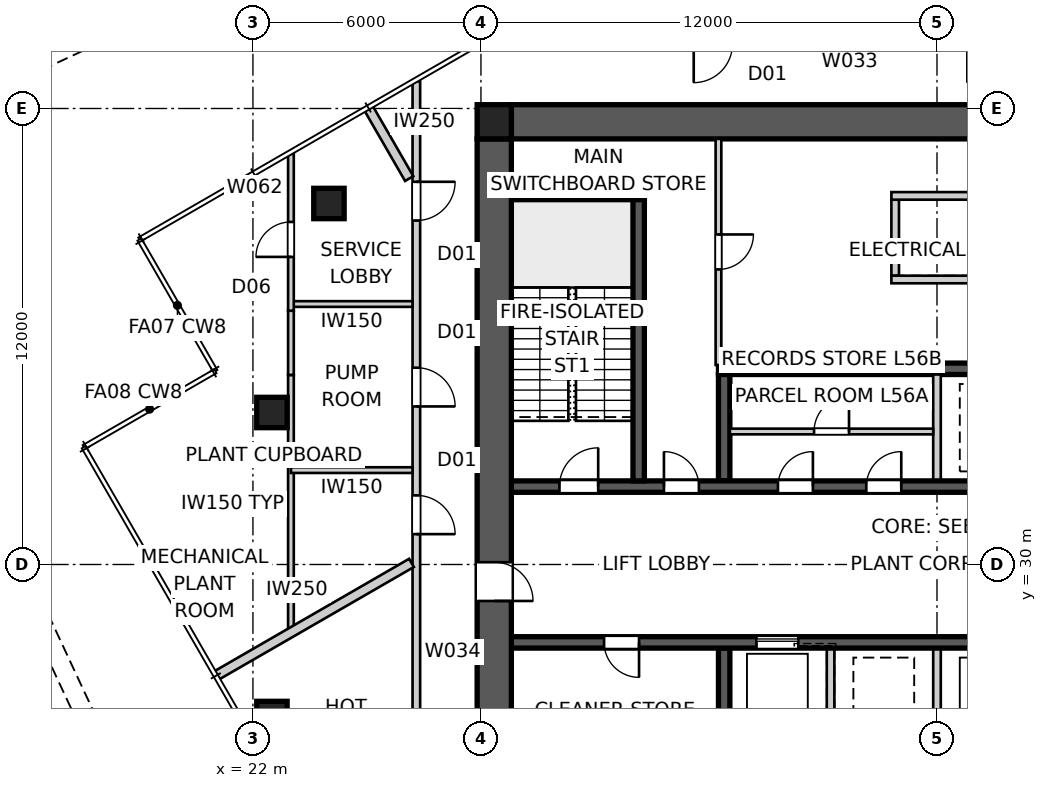
"""IFC4 building model, lengths in metres.
Left out: names, types, materials, properties, quantities, classifications, styles, units other than length and angle.
Written with IfcOpenShell. Run it as: python <this file> out.ifc"""

import sys

from ifc_helpers import new_model, si_unit, direction, frame, frame_2d, origin, origin_2d, place, context, subcontext, project, spatial, polyline, rectangle, outline, extrude, element, fill, save


model = new_model("IFC4")
c1 = context("Model", 3, precision=1e-05, world=origin(), true_north=direction((0.0, 1.0)))
c2 = subcontext(c1, "Body", "Model", "MODEL_VIEW")
j1 = project(units=[si_unit("LENGTHUNIT", "METRE"), si_unit("PLANEANGLEUNIT", "RADIAN")], contexts=[c1])
p1 = place(None, origin())
s1 = spatial("IfcSite", under=j1, at=p1, CompositionType="ELEMENT")
p2 = place(p1, origin())
s2 = spatial("IfcBuilding", under=s1, at=p2, CompositionType="ELEMENT")
p3 = place(p2, frame((0.0, 0.0, 203.2)))
s3 = spatial("IfcBuildingStorey", under=s2, at=p3, CompositionType="ELEMENT", Elevation=203.2)
p4 = place(p3, frame((28.8, 41.65, 0.0), z_axis=(0.0, 0.0, 1.0), x_axis=(1.0, 0.0, 0.0)))
e1 = element("IfcWall", 1, at=p4, inside=s3, PredefinedType="SHEAR", context=c2, shape_type="SweptSolid", body=[
    extrude(outline(polyline([(0.0, -0.45), (22.4, -0.45), (22.4, -0.025), (22.85, -0.025), (22.85, 0.025), (22.4, 0.025), (22.4, 0.45), (0.0, 0.45), (0.0, 0.025), (-0.45, 0.025), (-0.45, -0.025), (0.0, -0.025), (0.0, -0.45)])), origin(), (0.0, 0.0, 1.0), 5.0),
])
p5 = place(p3, frame((28.35, 41.2, 0.0), z_axis=(0.0, 0.0, 1.0), x_axis=(0.0, -1.0, 0.0)))
e2 = element("IfcWall", 2, at=p5, inside=s3, PredefinedType="SHEAR", context=c2, shape_type="SweptSolid", body=[
    extrude(outline(polyline([(0.0, -0.45), (22.4, -0.45), (22.4, -0.025), (22.85, -0.025), (22.85, 0.025), (22.4, 0.025), (22.4, 0.45), (0.0, 0.45), (0.0, 0.025), (-0.45, 0.025), (-0.45, -0.025), (0.0, -0.025), (0.0, -0.45)])), origin(), (0.0, 0.0, 1.0), 5.0),
])
p6 = place(p5, frame((11.14, 0.0, 0.0)))
e3 = element("IfcOpeningElement", 3, at=p6, cuts=e2, PredefinedType="OPENING", context=c2, shape_type="SweptSolid", body=[
    extrude(rectangle(XDim=1.02, YDim=2.4, at=frame_2d((0.51, 1.2))), frame((0.0, 0.46, 0.0), z_axis=(0.0, -1.0, 0.0), x_axis=(1.0, 0.0, 0.0)), (0.0, 0.0, 1.0), 0.92),
])
p7 = place(p3, frame((28.8, 32.05, 0.0), z_axis=(0.0, 0.0, 1.0), x_axis=(1.0, 0.0, 0.0)))
e4 = element("IfcWall", 4, at=p7, inside=s3, PredefinedType="SHEAR", context=c2, shape_type="SweptSolid", body=[
    extrude(rectangle(XDim=22.4, YDim=0.3, at=frame_2d((11.2, 0.0))), origin(), (0.0, 0.0, 1.0), 5.0),
])
p8 = place(p7, frame((19.04, 0.0, 0.0)))
e5 = element("IfcOpeningElement", 5, at=p8, cuts=e4, PredefinedType="OPENING", context=c2, shape_type="SweptSolid", body=[
    extrude(rectangle(XDim=0.92, YDim=2.1, at=frame_2d((0.46, 1.05))), frame((0.0, 0.16, 0.0), z_axis=(0.0, -1.0, 0.0), x_axis=(1.0, 0.0, 0.0)), (0.0, 0.0, 1.0), 0.32),
])
p9 = place(p7, frame((1.265, 0.0, 0.0)))
e6 = element("IfcOpeningElement", 6, at=p9, cuts=e4, PredefinedType="OPENING", context=c2, shape_type="SweptSolid", body=[
    extrude(rectangle(XDim=1.02, YDim=2.1, at=frame_2d((0.51, 1.05))), frame((0.0, 0.16, 0.0), z_axis=(0.0, -1.0, 0.0), x_axis=(1.0, 0.0, 0.0)), (0.0, 0.0, 1.0), 0.32),
])
p10 = place(p7, frame((4.015, 0.0, 0.0)))
e7 = element("IfcOpeningElement", 7, at=p10, cuts=e4, PredefinedType="OPENING", context=c2, shape_type="SweptSolid", body=[
    extrude(rectangle(XDim=0.92, YDim=2.1, at=frame_2d((0.46, 1.05))), frame((0.0, 0.16, 0.0), z_axis=(0.0, -1.0, 0.0), x_axis=(1.0, 0.0, 0.0)), (0.0, 0.0, 1.0), 0.32),
])
p11 = place(p7, frame((7.015, 0.0, 0.0)))
e8 = element("IfcOpeningElement", 8, at=p11, cuts=e4, PredefinedType="OPENING", context=c2, shape_type="SweptSolid", body=[
    extrude(rectangle(XDim=0.92, YDim=2.1, at=frame_2d((0.46, 1.05))), frame((0.0, 0.16, 0.0), z_axis=(0.0, -1.0, 0.0), x_axis=(1.0, 0.0, 0.0)), (0.0, 0.0, 1.0), 0.32),
])
p12 = place(p7, frame((9.34, 0.0, 0.0)))
e9 = element("IfcOpeningElement", 9, at=p12, cuts=e4, PredefinedType="OPENING", context=c2, shape_type="SweptSolid", body=[
    extrude(rectangle(XDim=0.92, YDim=2.1, at=frame_2d((0.46, 1.05))), frame((0.0, 0.16, 0.0), z_axis=(0.0, -1.0, 0.0), x_axis=(1.0, 0.0, 0.0)), (0.0, 0.0, 1.0), 0.32),
])
p13 = place(p7, frame((14.85, 0.0, 0.0)))
e10 = element("IfcOpeningElement", 10, at=p13, cuts=e4, PredefinedType="OPENING", context=c2, shape_type="SweptSolid", body=[
    extrude(rectangle(XDim=1.1, YDim=2.1, at=frame_2d((0.55, 1.05))), frame((0.0, 0.16, 0.0), z_axis=(0.0, -1.0, 0.0), x_axis=(1.0, 0.0, 0.0)), (0.0, 0.0, 1.0), 0.32),
])
p14 = place(p3, frame((51.2, 27.95, 0.0), z_axis=(0.0, 0.0, 1.0), x_axis=(-1.0, 0.0, 0.0)))
e11 = element("IfcWall", 11, at=p14, inside=s3, PredefinedType="SHEAR", context=c2, shape_type="SweptSolid", body=[
    extrude(rectangle(XDim=22.4, YDim=0.3, at=frame_2d((11.2, 0.0))), origin(), (0.0, 0.0, 1.0), 5.0),
])
p15 = place(p14, frame((19.04, 0.0, 0.0)))
e12 = element("IfcOpeningElement", 12, at=p15, cuts=e11, PredefinedType="OPENING", context=c2, shape_type="SweptSolid", body=[
    extrude(rectangle(XDim=0.92, YDim=2.1, at=frame_2d((0.46, 1.05))), frame((0.0, 0.16, 0.0), z_axis=(0.0, -1.0, 0.0), x_axis=(1.0, 0.0, 0.0)), (0.0, 0.0, 1.0), 0.32),
])
p16 = place(p14, frame((1.265, 0.0, 0.0)))
e13 = element("IfcOpeningElement", 13, at=p16, cuts=e11, PredefinedType="OPENING", context=c2, shape_type="SweptSolid", body=[
    extrude(rectangle(XDim=1.02, YDim=2.1, at=frame_2d((0.51, 1.05))), frame((0.0, 0.16, 0.0), z_axis=(0.0, -1.0, 0.0), x_axis=(1.0, 0.0, 0.0)), (0.0, 0.0, 1.0), 0.32),
])
p17 = place(p14, frame((4.015, 0.0, 0.0)))
e14 = element("IfcOpeningElement", 14, at=p17, cuts=e11, PredefinedType="OPENING", context=c2, shape_type="SweptSolid", body=[
    extrude(rectangle(XDim=0.92, YDim=2.1, at=frame_2d((0.46, 1.05))), frame((0.0, 0.16, 0.0), z_axis=(0.0, -1.0, 0.0), x_axis=(1.0, 0.0, 0.0)), (0.0, 0.0, 1.0), 0.32),
])
p18 = place(p14, frame((6.45, 0.0, 0.0)))
e15 = element("IfcOpeningElement", 15, at=p18, cuts=e11, PredefinedType="OPENING", context=c2, shape_type="SweptSolid", body=[
    extrude(rectangle(XDim=1.1, YDim=2.1, at=frame_2d((0.55, 1.05))), frame((0.0, 0.16, 0.0), z_axis=(0.0, -1.0, 0.0), x_axis=(1.0, 0.0, 0.0)), (0.0, 0.0, 1.0), 0.32),
])
p19 = place(p14, frame((9.25, 0.0, 0.0)))
e16 = element("IfcOpeningElement", 16, at=p19, cuts=e11, PredefinedType="OPENING", context=c2, shape_type="SweptSolid", body=[
    extrude(rectangle(XDim=1.1, YDim=2.1, at=frame_2d((0.55, 1.05))), frame((0.0, 0.16, 0.0), z_axis=(0.0, -1.0, 0.0), x_axis=(1.0, 0.0, 0.0)), (0.0, 0.0, 1.0), 0.32),
])
p20 = place(p14, frame((14.85, 0.0, 0.0)))
e17 = element("IfcOpeningElement", 17, at=p20, cuts=e11, PredefinedType="OPENING", context=c2, shape_type="SweptSolid", body=[
    extrude(rectangle(XDim=1.1, YDim=2.1, at=frame_2d((0.55, 1.05))), frame((0.0, 0.16, 0.0), z_axis=(0.0, -1.0, 0.0), x_axis=(1.0, 0.0, 0.0)), (0.0, 0.0, 1.0), 0.32),
])
p21 = place(p3, frame((34.25, 35.15, 0.0), z_axis=(0.0, 0.0, 1.0), x_axis=(1.0, 0.0, 0.0)))
e18 = element("IfcWall", 18, at=p21, inside=s3, PredefinedType="SHEAR", context=c2, shape_type="SweptSolid", body=[
    extrude(rectangle(XDim=11.5, YDim=0.3, at=frame_2d((5.75, 0.0))), origin(), (0.0, 0.0, 1.0), 5.0),
])
p22 = place(p3, frame((34.4, 32.2, 0.0), z_axis=(0.0, 0.0, 1.0), x_axis=(0.0, 1.0, 0.0)))
e19 = element("IfcWall", 19, at=p22, inside=s3, PredefinedType="SHEAR", context=c2, shape_type="SweptSolid", body=[
    extrude(rectangle(XDim=2.8, YDim=0.3, at=frame_2d((1.4, 0.0))), origin(), (0.0, 0.0, 1.0), 5.0),
])
for number, where, z_axis, x_axis in (
    (20, (40.0, 32.2, 0.0), (0.0, 0.0, 1.0), (0.0, 1.0, 0.0)),
    (21, (40.0, 27.8, 0.0), (0.0, 0.0, 1.0), (0.0, -1.0, 0.0)),
    (22, (37.2, 27.8, 0.0), (0.0, 0.0, 1.0), (0.0, -1.0, 0.0)),
):
    element("IfcWall", number, at=place(p3, frame(where, z_axis=z_axis, x_axis=x_axis)), inside=s3, PredefinedType="SOLIDWALL", context=c2, shape_type="SweptSolid", body=[
        extrude(rectangle(XDim=2.8, YDim=0.2, at=frame_2d((1.4, 0.0))), origin(), (0.0, 0.0, 1.0), 5.0),
    ])
p23 = place(p3, frame((34.4, 27.8, 0.0), z_axis=(0.0, 0.0, 1.0), x_axis=(0.0, -1.0, 0.0)))
e23 = element("IfcWall", 23, at=p23, inside=s3, PredefinedType="SHEAR", context=c2, shape_type="SweptSolid", body=[
    extrude(rectangle(XDim=2.8, YDim=0.3, at=frame_2d((1.4, 0.0))), origin(), (0.0, 0.0, 1.0), 5.0),
])
p24 = place(p3, frame((32.15, 32.2, 0.0), z_axis=(0.0, 0.0, 1.0), x_axis=(0.0, 1.0, 0.0)))
e24 = element("IfcWall", 24, at=p24, inside=s3, PredefinedType="SHEAR", context=c2, shape_type="SweptSolid", body=[
    extrude(rectangle(XDim=7.7, YDim=0.3, at=frame_2d((3.85, 0.0))), origin(), (0.0, 0.0, 1.0), 5.0),
])
p25 = place(p3, frame((28.8, 39.75, 0.0), z_axis=(0.0, 0.0, 1.0), x_axis=(1.0, 0.0, 0.0)))
e25 = element("IfcWall", 25, at=p25, inside=s3, PredefinedType="SHEAR", context=c2, shape_type="SweptSolid", body=[
    extrude(rectangle(XDim=3.5, YDim=0.3, at=frame_2d((1.75, 0.0))), origin(), (0.0, 0.0, 1.0), 5.0),
])
p26 = place(p3, frame((38.9, 37.6, 0.0), z_axis=(0.0, 0.0, 1.0), x_axis=(0.0, 1.0, 0.0)))
e26 = element("IfcWall", 26, at=p26, inside=s3, PredefinedType="SOLIDWALL", context=c2, shape_type="SweptSolid", body=[
    extrude(rectangle(XDim=2.0, YDim=0.2, at=frame_2d((1.0, 0.0))), origin(), (0.0, 0.0, 1.0), 5.0),
])
for number, where, z_axis, x_axis in (
    (27, (38.8, 37.5, 0.0), (0.0, 0.0, 1.0), (1.0, 0.0, 0.0)),
    (28, (38.8, 39.7, 0.0), (0.0, 0.0, 1.0), (1.0, 0.0, 0.0)),
):
    element("IfcWall", number, at=place(p3, frame(where, z_axis=z_axis, x_axis=x_axis)), inside=s3, PredefinedType="SOLIDWALL", context=c2, shape_type="SweptSolid", body=[
        extrude(rectangle(XDim=2.4, YDim=0.2, at=frame_2d((1.2, 0.0))), origin(), (0.0, 0.0, 1.0), 5.0),
    ])
p27 = place(p3, frame((28.35, 41.65, 0.0), z_axis=(0.0, 0.0, 1.0), x_axis=(1.0, 0.0, 0.0)))
e29 = element("IfcColumn", 29, at=p27, inside=s3, PredefinedType="COLUMN", context=c2, shape_type="SweptSolid", body=[
    extrude(rectangle(XDim=0.9, YDim=0.9, at=origin_2d()), origin(), (0.0, 0.0, 1.0), 5.0),
])
for number, where, z_axis, x_axis in (
    (30, (24.0, 39.5, 0.0), (0.0, 0.0, 1.0), (1.0, 0.0, 0.0)),
    (31, (22.5, 34.0, 0.0), (0.0, 0.0, 1.0), (1.0, 0.0, 0.0)),
    (32, (22.5, 26.0, 0.0), (0.0, 0.0, 1.0), (1.0, 0.0, 0.0)),
):
    element("IfcColumn", number, at=place(p3, frame(where, z_axis=z_axis, x_axis=x_axis)), inside=s3, PredefinedType="COLUMN", context=c2, shape_type="SweptSolid", body=[
        extrude(rectangle(XDim=0.8, YDim=0.8, at=origin_2d()), origin(), (0.0, 0.0, 1.0), 5.0),
    ])
p28 = place(p3, frame((26.3, 42.713, 0.0), z_axis=(0.0, 0.0, 1.0), x_axis=(0.0, -1.0, 0.0)))
e33 = element("IfcWall", 33, at=p28, inside=s3, PredefinedType="PARTITIONING", context=c2, shape_type="SweptSolid", body=[
    extrude(rectangle(XDim=24.704, YDim=0.2, at=frame_2d((12.352, 0.0))), origin(), (0.0, 0.0, 1.0), 4.85),
])
p29 = place(p28, frame((18.094, 0.0, 0.0)))
e34 = element("IfcOpeningElement", 34, at=p29, cuts=e33, PredefinedType="OPENING", context=c2, shape_type="SweptSolid", body=[
    extrude(rectangle(XDim=1.02, YDim=2.34, at=frame_2d((0.51, 1.17))), frame((0.0, 0.11, 0.0), z_axis=(0.0, -1.0, 0.0), x_axis=(1.0, 0.0, 0.0)), (0.0, 0.0, 1.0), 0.22),
])
p30 = place(p28, frame((2.642, 0.0, 0.0)))
e35 = element("IfcOpeningElement", 35, at=p30, cuts=e33, PredefinedType="OPENING", context=c2, shape_type="SweptSolid", body=[
    extrude(rectangle(XDim=1.02, YDim=2.34, at=frame_2d((0.51, 1.17))), frame((0.0, 0.11, 0.0), z_axis=(0.0, -1.0, 0.0), x_axis=(1.0, 0.0, 0.0)), (0.0, 0.0, 1.0), 0.22),
])
p31 = place(p28, frame((7.534, 0.0, 0.0)))
e36 = element("IfcOpeningElement", 36, at=p31, cuts=e33, PredefinedType="OPENING", context=c2, shape_type="SweptSolid", body=[
    extrude(rectangle(XDim=1.02, YDim=2.34, at=frame_2d((0.51, 1.17))), frame((0.0, 0.11, 0.0), z_axis=(0.0, -1.0, 0.0), x_axis=(1.0, 0.0, 0.0)), (0.0, 0.0, 1.0), 0.22),
])
p32 = place(p28, frame((10.894, 0.0, 0.0)))
e37 = element("IfcOpeningElement", 37, at=p32, cuts=e33, PredefinedType="OPENING", context=c2, shape_type="SweptSolid", body=[
    extrude(rectangle(XDim=1.02, YDim=2.34, at=frame_2d((0.51, 1.17))), frame((0.0, 0.11, 0.0), z_axis=(0.0, -1.0, 0.0), x_axis=(1.0, 0.0, 0.0)), (0.0, 0.0, 1.0), 0.22),
])
p33 = place(p3, frame((25.031, 42.027, 0.0), z_axis=(0.0, 0.0, 1.0), x_axis=(0.500087501723, -0.865974878747, 0.0)))
e38 = element("IfcWall", 38, at=p33, inside=s3, PredefinedType="PARTITIONING", context=c2, shape_type="SweptSolid", body=[
    extrude(rectangle(XDim=2.161, YDim=0.25, at=frame_2d((1.081, 0.0))), origin(), (0.0, 0.0, 1.0), 4.85),
])
p34 = place(p3, frame((21.023, 27.069, 0.0), z_axis=(0.0, 0.0, 1.0), x_axis=(0.866013262469, 0.500021028785, 0.0)))
e39 = element("IfcWall", 39, at=p34, inside=s3, PredefinedType="PARTITIONING", context=c2, shape_type="SweptSolid", body=[
    extrude(rectangle(XDim=5.946, YDim=0.25, at=frame_2d((2.973, 0.0))), origin(), (0.0, 0.0, 1.0), 4.85),
])
p35 = place(p3, frame((34.25, 41.2, 0.0), z_axis=(0.0, 0.0, 1.0), x_axis=(0.0, -1.0, 0.0)))
e40 = element("IfcWall", 40, at=p35, inside=s3, PredefinedType="SOLIDWALL", context=c2, shape_type="SweptSolid", body=[
    extrude(rectangle(XDim=5.95, YDim=0.15, at=frame_2d((2.975, 0.0))), origin(), (0.0, 0.0, 1.0), 4.85),
])
p36 = place(p35, frame((2.515, 0.0, 0.0)))
e41 = element("IfcOpeningElement", 41, at=p36, cuts=e40, PredefinedType="OPENING", context=c2, shape_type="SweptSolid", body=[
    extrude(rectangle(XDim=0.92, YDim=2.1, at=frame_2d((0.46, 1.05))), frame((0.0, 0.085, 0.0), z_axis=(0.0, -1.0, 0.0), x_axis=(1.0, 0.0, 0.0)), (0.0, 0.0, 1.0), 0.17),
])
p37 = place(p3, frame((26.2, 36.855, 0.0), z_axis=(0.0, 0.0, 1.0), x_axis=(-1.0, 0.0, 0.0)))
e42 = element("IfcWall", 42, at=p37, inside=s3, PredefinedType="SOLIDWALL", context=c2, shape_type="SweptSolid", body=[
    extrude(rectangle(XDim=3.2, YDim=0.15, at=frame_2d((1.6, 0.0))), origin(), (0.0, 0.0, 1.0), 4.85),
])
p38 = place(p3, frame((23.0, 28.21, 0.0), z_axis=(0.0, 0.0, 1.0), x_axis=(0.0, 1.0, 0.0)))
e43 = element("IfcWall", 43, at=p38, inside=s3, PredefinedType="SOLIDWALL", context=c2, shape_type="SweptSolid", body=[
    extrude(rectangle(XDim=6.778, YDim=0.15, at=frame_2d((3.389, 0.0))), origin(), (0.0, 0.0, 1.0), 4.85),
])
p39 = place(p3, frame((23.0, 34.988, 0.0), z_axis=(0.0, 0.0, 1.0), x_axis=(0.0, 1.0, 0.0)))
e44 = element("IfcWall", 44, at=p39, inside=s3, PredefinedType="SOLIDWALL", context=c2, shape_type="SweptSolid", body=[
    extrude(rectangle(XDim=1.69, YDim=0.15, at=frame_2d((0.845, 0.0))), origin(), (0.0, 0.0, 1.0), 3.85),
])
p40 = place(p3, frame((23.0, 36.678, 0.0), z_axis=(0.0, 0.0, 1.0), x_axis=(0.0, 1.0, 0.0)))
e45 = element("IfcWall", 45, at=p40, inside=s3, PredefinedType="SOLIDWALL", context=c2, shape_type="SweptSolid", body=[
    extrude(rectangle(XDim=4.13, YDim=0.15, at=frame_2d((2.065, 0.0))), origin(), (0.0, 0.0, 1.0), 4.85),
])
p41 = place(p40, frame((1.416, 0.0, 0.0)))
e46 = element("IfcOpeningElement", 46, at=p41, cuts=e45, PredefinedType="OPENING", context=c2, shape_type="SweptSolid", body=[
    extrude(rectangle(XDim=0.92, YDim=2.1, at=frame_2d((0.46, 1.05))), frame((0.0, 0.085, 0.0), z_axis=(0.0, -1.0, 0.0), x_axis=(1.0, 0.0, 0.0)), (0.0, 0.0, 1.0), 0.17),
])
p42 = place(p3, frame((26.2, 32.484, 0.0), z_axis=(0.0, 0.0, 1.0), x_axis=(-1.0, 0.0, 0.0)))
e47 = element("IfcWall", 47, at=p42, inside=s3, PredefinedType="SOLIDWALL", context=c2, shape_type="SweptSolid", body=[
    extrude(rectangle(XDim=3.2, YDim=0.15, at=frame_2d((1.6, 0.0))), origin(), (0.0, 0.0, 1.0), 4.85),
])
p43 = place(p3, frame((34.55, 33.5, 0.0), z_axis=(0.0, 0.0, 1.0), x_axis=(1.0, 0.0, 0.0)))
e48 = element("IfcWall", 48, at=p43, inside=s3, PredefinedType="SOLIDWALL", context=c2, shape_type="SweptSolid", body=[
    extrude(rectangle(XDim=5.35, YDim=0.15, at=frame_2d((2.675, 0.0))), origin(), (0.0, 0.0, 1.0), 4.85),
])
p44 = place(p43, frame((2.215, 0.0, 0.0)))
e49 = element("IfcOpeningElement", 49, at=p44, cuts=e48, PredefinedType="OPENING", context=c2, shape_type="SweptSolid", body=[
    extrude(rectangle(XDim=0.92, YDim=2.1, at=frame_2d((0.46, 1.05))), frame((0.0, 0.085, 0.0), z_axis=(0.0, -1.0, 0.0), x_axis=(1.0, 0.0, 0.0)), (0.0, 0.0, 1.0), 0.17),
])
p45 = place(p15, origin())
e50 = element("IfcDoor", 50, at=p45, inside=s3, OperationType="SINGLE_SWING_LEFT", PredefinedType="DOOR", context=c2, shape_type="SweptSolid", body=[
    extrude(rectangle(XDim=0.92, YDim=2.1, at=frame_2d((0.46, 1.05))), frame((0.0, 0.025, 0.0), z_axis=(0.0, -1.0, 0.0), x_axis=(1.0, 0.0, 0.0)), (0.0, 0.0, 1.0), 0.05),
])
fill(e12, e50)
p46 = place(p9, origin())
e51 = element("IfcDoor", 51, at=p46, inside=s3, OperationType="SINGLE_SWING_RIGHT", PredefinedType="DOOR", context=c2, shape_type="SweptSolid", body=[
    extrude(rectangle(XDim=1.02, YDim=2.1, at=frame_2d((0.51, 1.05))), frame((0.0, 0.025, 0.0), z_axis=(0.0, -1.0, 0.0), x_axis=(1.0, 0.0, 0.0)), (0.0, 0.0, 1.0), 0.05),
])
fill(e6, e51)
p47 = place(p10, origin())
e52 = element("IfcDoor", 52, at=p47, inside=s3, OperationType="SINGLE_SWING_LEFT", PredefinedType="DOOR", context=c2, shape_type="SweptSolid", body=[
    extrude(rectangle(XDim=0.92, YDim=2.1, at=frame_2d((0.46, 1.05))), frame((0.0, 0.025, 0.0), z_axis=(0.0, -1.0, 0.0), x_axis=(1.0, 0.0, 0.0)), (0.0, 0.0, 1.0), 0.05),
])
fill(e7, e52)
p48 = place(p30, origin())
e53 = element("IfcDoor", 53, at=p48, inside=s3, OperationType="SINGLE_SWING_LEFT", PredefinedType="DOOR", context=c2, shape_type="SweptSolid", body=[
    extrude(rectangle(XDim=1.02, YDim=2.34, at=frame_2d((0.51, 1.17))), frame((0.0, 0.025, 0.0), z_axis=(0.0, -1.0, 0.0), x_axis=(1.0, 0.0, 0.0)), (0.0, 0.0, 1.0), 0.05),
])
fill(e35, e53)
p49 = place(p31, origin())
e54 = element("IfcDoor", 54, at=p49, inside=s3, OperationType="SINGLE_SWING_RIGHT", PredefinedType="DOOR", context=c2, shape_type="SweptSolid", body=[
    extrude(rectangle(XDim=1.02, YDim=2.34, at=frame_2d((0.51, 1.17))), frame((0.0, 0.025, 0.0), z_axis=(0.0, -1.0, 0.0), x_axis=(1.0, 0.0, 0.0)), (0.0, 0.0, 1.0), 0.05),
])
fill(e36, e54)
p50 = place(p32, origin())
e55 = element("IfcDoor", 55, at=p50, inside=s3, OperationType="SINGLE_SWING_RIGHT", PredefinedType="DOOR", context=c2, shape_type="SweptSolid", body=[
    extrude(rectangle(XDim=1.02, YDim=2.34, at=frame_2d((0.51, 1.17))), frame((0.0, 0.025, 0.0), z_axis=(0.0, -1.0, 0.0), x_axis=(1.0, 0.0, 0.0)), (0.0, 0.0, 1.0), 0.05),
])
fill(e37, e55)
p51 = place(p36, origin())
e56 = element("IfcDoor", 56, at=p51, inside=s3, OperationType="SINGLE_SWING_LEFT", PredefinedType="DOOR", context=c2, shape_type="SweptSolid", body=[
    extrude(rectangle(XDim=0.92, YDim=2.1, at=frame_2d((0.46, 1.05))), frame((0.0, 0.025, 0.0), z_axis=(0.0, -1.0, 0.0), x_axis=(1.0, 0.0, 0.0)), (0.0, 0.0, 1.0), 0.05),
])
fill(e41, e56)
p52 = place(p41, origin())
e57 = element("IfcDoor", 57, at=p52, inside=s3, OperationType="SINGLE_SWING_LEFT", PredefinedType="DOOR", context=c2, shape_type="SweptSolid", body=[
    extrude(rectangle(XDim=0.92, YDim=2.1, at=frame_2d((0.46, 1.05))), frame((0.0, 0.025, 0.0), z_axis=(0.0, -1.0, 0.0), x_axis=(1.0, 0.0, 0.0)), (0.0, 0.0, 1.0), 0.05),
])
fill(e46, e57)
p53 = place(p11, origin())
e58 = element("IfcDoor", 58, at=p53, inside=s3, OperationType="SINGLE_SWING_RIGHT", PredefinedType="DOOR", context=c2, shape_type="SweptSolid", body=[
    extrude(rectangle(XDim=0.92, YDim=2.1, at=frame_2d((0.46, 1.05))), frame((0.0, 0.025, 0.0), z_axis=(0.0, -1.0, 0.0), x_axis=(1.0, 0.0, 0.0)), (0.0, 0.0, 1.0), 0.05),
])
fill(e8, e58)
p54 = place(p12, origin())
e59 = element("IfcDoor", 59, at=p54, inside=s3, OperationType="SINGLE_SWING_RIGHT", PredefinedType="DOOR", context=c2, shape_type="SweptSolid", body=[
    extrude(rectangle(XDim=0.92, YDim=2.1, at=frame_2d((0.46, 1.05))), frame((0.0, 0.025, 0.0), z_axis=(0.0, -1.0, 0.0), x_axis=(1.0, 0.0, 0.0)), (0.0, 0.0, 1.0), 0.05),
])
fill(e9, e59)
p55 = place(p44, origin())
e60 = element("IfcDoor", 60, at=p55, inside=s3, OperationType="SINGLE_SWING_RIGHT", PredefinedType="DOOR", context=c2, shape_type="SweptSolid", body=[
    extrude(rectangle(XDim=0.92, YDim=2.1, at=frame_2d((0.46, 1.05))), frame((0.0, 0.025, 0.0), z_axis=(0.0, -1.0, 0.0), x_axis=(1.0, 0.0, 0.0)), (0.0, 0.0, 1.0), 0.05),
])
fill(e49, e60)
p56 = place(p6, origin())
e61 = element("IfcDoor", 61, at=p56, inside=s3, OperationType="SINGLE_SWING_RIGHT", PredefinedType="DOOR", context=c2, shape_type="SweptSolid", body=[
    extrude(rectangle(XDim=1.02, YDim=2.4, at=frame_2d((0.51, 1.2))), frame((0.0, 0.025, 0.0), z_axis=(0.0, -1.0, 0.0), x_axis=(1.0, 0.0, 0.0)), (0.0, 0.0, 1.0), 0.05),
])
fill(e3, e61)
p57 = place(p20, origin())
e62 = element("IfcDoor", 62, at=p57, inside=s3, OperationType="SLIDING_TO_LEFT", PredefinedType="DOOR", context=c2, shape_type="SweptSolid", body=[
    extrude(rectangle(XDim=1.1, YDim=2.1, at=frame_2d((0.55, 1.05))), frame((0.0, 0.025, 0.0), z_axis=(0.0, -1.0, 0.0), x_axis=(1.0, 0.0, 0.0)), (0.0, 0.0, 1.0), 0.05),
])
fill(e17, e62)
save(model, sys.argv[1])
